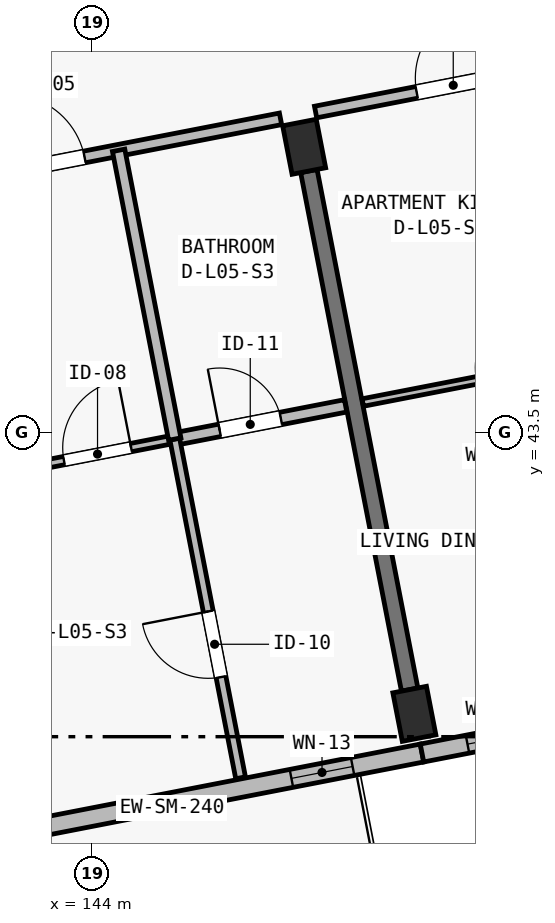
"""IFC4 building model, lengths in metres.
Left out: names, types, materials, properties, quantities, classifications, styles, units other than length and angle.
Written with IfcOpenShell. Run it as: python <this file> out.ifc"""

import sys

from ifc_helpers import new_model, si_unit, direction, frame, frame_2d, origin, origin_2d, place, context, subcontext, project, spatial, rectangle, extrude, element, fill, save


model = new_model("IFC4")
c1 = context("Model", 3, precision=1e-05, world=origin(), true_north=direction((0.0, 1.0)))
c2 = subcontext(c1, "Body", "Model", "MODEL_VIEW")
j1 = project(units=[si_unit("LENGTHUNIT", "METRE"), si_unit("PLANEANGLEUNIT", "RADIAN")], contexts=[c1])
p1 = place(None, origin())
s1 = spatial("IfcSite", under=j1, at=p1, CompositionType="ELEMENT")
p2 = place(p1, origin())
s2 = spatial("IfcBuilding", under=s1, at=p2, CompositionType="ELEMENT")
p3 = place(p2, frame((0.0, 0.0, 18.15)))
s3 = spatial("IfcBuildingStorey", under=s2, at=p3, CompositionType="ELEMENT", Elevation=18.15)
for number, where, z_axis, x_axis in (
    (1, (148.241, 39.801, 0.0), (0.0, 0.0, 1.0), (0.982, 0.191, 0.0)),
    (2, (146.791, 47.261, 0.0), (0.0, 0.0, 1.0), (0.982, 0.191, 0.0)),
):
    element("IfcColumn", number, at=place(p3, frame(where, z_axis=z_axis, x_axis=x_axis)), inside=s3, PredefinedType="COLUMN", context=c2, shape_type="SweptSolid", body=[
        extrude(rectangle(XDim=0.45, YDim=0.65, at=origin_2d()), origin(), (0.0, 0.0, 1.0), 3.25),
    ])
p4 = place(p3, frame((148.179, 40.12, 0.0), z_axis=(0.0, 0.0, 1.0), x_axis=(-0.190817005532, 0.981625626397, 0.0)))
e3 = element("IfcWall", 3, at=p4, inside=s3, PredefinedType="SHEAR", context=c2, shape_type="SweptSolid", body=[
    extrude(rectangle(XDim=6.95, YDim=0.22, at=frame_2d((3.475, 0.0))), origin(), (0.0, 0.0, 1.0), 2.5),
])
p5 = place(p3, frame((148.342, 39.285, 0.0), z_axis=(0.0, 0.0, 1.0), x_axis=(-0.981631269434, -0.190787973596, 0.0)))
e4 = element("IfcWall", 4, at=p5, inside=s3, PredefinedType="SOLIDWALL", context=c2, shape_type="SweptSolid", body=[
    extrude(rectangle(XDim=7.6, YDim=0.24, at=frame_2d((3.8, 0.0))), origin(), (0.0, 0.0, 1.0), 3.0),
])
p6 = place(p5, frame((5.169, 0.0, 0.0)))
e5 = element("IfcOpeningElement", 5, at=p6, cuts=e4, PredefinedType="OPENING", context=c2, shape_type="SweptSolid", body=[
    extrude(rectangle(XDim=1.5, YDim=2.12, at=frame_2d((0.75, 1.06))), frame((0.0, 0.135, 0.0), z_axis=(0.0, -1.0, 0.0), x_axis=(1.0, 0.0, 0.0)), (0.0, 0.0, 1.0), 0.27),
])
p7 = place(p5, frame((0.93, 0.0, 0.5)))
e6 = element("IfcOpeningElement", 6, at=p7, cuts=e4, PredefinedType="OPENING", context=c2, shape_type="SweptSolid", body=[
    extrude(rectangle(XDim=0.82, YDim=2.18, at=frame_2d((0.41, 1.09))), frame((0.0, 0.135, 0.0), z_axis=(0.0, -1.0, 0.0), x_axis=(1.0, 0.0, 0.0)), (0.0, 0.0, 1.0), 0.27),
])
p8 = place(p3, frame((155.802, 40.735, 0.0), z_axis=(0.0, 0.0, 1.0), x_axis=(-0.981626422232, -0.190812911449, 0.0)))
e7 = element("IfcWall", 7, at=p8, inside=s3, PredefinedType="SOLIDWALL", context=c2, shape_type="SweptSolid", body=[
    extrude(rectangle(XDim=7.6, YDim=0.24, at=frame_2d((3.8, 0.0))), origin(), (0.0, 0.0, 1.0), 3.0),
])
p9 = place(p8, frame((1.88, 0.0, 0.42)))
e8 = element("IfcOpeningElement", 8, at=p9, cuts=e7, PredefinedType="OPENING", context=c2, shape_type="SweptSolid", body=[
    extrude(rectangle(XDim=0.64, YDim=2.18, at=frame_2d((0.32, 1.09))), frame((0.0, 0.135, 0.0), z_axis=(0.0, -1.0, 0.0), x_axis=(1.0, 0.0, 0.0)), (0.0, 0.0, 1.0), 0.27),
])
p10 = place(p8, frame((4.848, 0.0, 0.42)))
e9 = element("IfcOpeningElement", 9, at=p10, cuts=e7, PredefinedType="OPENING", context=c2, shape_type="SweptSolid", body=[
    extrude(rectangle(XDim=0.7, YDim=2.36, at=frame_2d((0.35, 1.18))), frame((0.0, 0.135, 0.0), z_axis=(0.0, -1.0, 0.0), x_axis=(1.0, 0.0, 0.0)), (0.0, 0.0, 1.0), 0.27),
])
p11 = place(p8, frame((6.27, 0.0, 0.48)))
e10 = element("IfcOpeningElement", 10, at=p11, cuts=e7, PredefinedType="OPENING", context=c2, shape_type="SweptSolid", body=[
    extrude(rectangle(XDim=0.72, YDim=2.16, at=frame_2d((0.36, 1.08))), frame((0.0, 0.135, 0.0), z_axis=(0.0, -1.0, 0.0), x_axis=(1.0, 0.0, 0.0)), (0.0, 0.0, 1.0), 0.27),
])
p12 = place(p3, frame((142.451, 46.845, 0.0), z_axis=(0.0, 0.0, 1.0), x_axis=(0.981629934904, 0.190794839817, 0.0)))
e11 = element("IfcWall", 11, at=p12, inside=s3, PredefinedType="PARTITIONING", context=c2, shape_type="SweptSolid", body=[
    extrude(rectangle(XDim=4.105, YDim=0.155, at=frame_2d((2.052, 0.0))), origin(), (0.0, 0.0, 1.0), 2.97),
])
p13 = place(p12, frame((0.458, 0.0, 0.0)))
e12 = element("IfcOpeningElement", 12, at=p13, cuts=e11, PredefinedType="OPENING", context=c2, shape_type="SweptSolid", body=[
    extrude(rectangle(XDim=1.02, YDim=2.2, at=frame_2d((0.51, 1.1))), frame((0.0, 0.093, 0.0), z_axis=(0.0, -1.0, 0.0), x_axis=(1.0, 0.0, 0.0)), (0.0, 0.0, 1.0), 0.185),
])
p14 = place(p3, frame((140.102, 42.446, 0.0), z_axis=(0.0, 0.0, 1.0), x_axis=(0.981621892043, 0.19083621528, 0.0)))
e13 = element("IfcWall", 13, at=p14, inside=s3, PredefinedType="PARTITIONING", context=c2, shape_type="SweptSolid", body=[
    extrude(rectangle(XDim=5.08, YDim=0.11, at=frame_2d((2.54, 0.0))), origin(), (0.0, 0.0, 1.0), 2.97),
])
p15 = place(p14, frame((3.595, 0.0, 0.0)))
e14 = element("IfcOpeningElement", 14, at=p15, cuts=e13, PredefinedType="OPENING", context=c2, shape_type="SweptSolid", body=[
    extrude(rectangle(XDim=0.9, YDim=2.1, at=frame_2d((0.45, 1.05))), frame((0.0, 0.07, 0.0), z_axis=(0.0, -1.0, 0.0), x_axis=(1.0, 0.0, 0.0)), (0.0, 0.0, 1.0), 0.14),
])
p16 = place(p3, frame((145.089, 43.416, 0.0), z_axis=(0.0, 0.0, 1.0), x_axis=(0.981640351498, 0.190741239147, 0.0)))
e15 = element("IfcWall", 15, at=p16, inside=s3, PredefinedType="PLUMBINGWALL", context=c2, shape_type="SweptSolid", body=[
    extrude(rectangle(XDim=2.29, YDim=0.165, at=frame_2d((1.145, 0.0))), origin(), (0.0, 0.0, 1.0), 2.97),
])
p17 = place(p16, frame((0.602, 0.0, 0.0)))
e16 = element("IfcOpeningElement", 16, at=p17, cuts=e15, PredefinedType="OPENING", context=c2, shape_type="SweptSolid", body=[
    extrude(rectangle(XDim=0.82, YDim=2.08, at=frame_2d((0.41, 1.04))), frame((0.0, 0.097, 0.0), z_axis=(0.0, -1.0, 0.0), x_axis=(1.0, 0.0, 0.0)), (0.0, 0.0, 1.0), 0.195),
])
p18 = place(p3, frame((145.955, 38.959, 0.0), z_axis=(0.0, 0.0, 1.0), x_axis=(-0.190797690541, 0.981629380817, 0.0)))
e17 = element("IfcWall", 17, at=p18, inside=s3, PredefinedType="PARTITIONING", context=c2, shape_type="SweptSolid", body=[
    extrude(rectangle(XDim=4.54, YDim=0.13, at=frame_2d((2.27, 0.0))), origin(), (0.0, 0.0, 1.0), 2.97),
])
p19 = place(p18, frame((1.35, 0.0, 0.0)))
e18 = element("IfcOpeningElement", 18, at=p19, cuts=e17, PredefinedType="OPENING", context=c2, shape_type="SweptSolid", body=[
    extrude(rectangle(XDim=0.88, YDim=2.1, at=frame_2d((0.44, 1.05))), frame((0.0, 0.08, 0.0), z_axis=(0.0, -1.0, 0.0), x_axis=(1.0, 0.0, 0.0)), (0.0, 0.0, 1.0), 0.16),
])
p20 = place(p3, frame((145.089, 43.416, 0.0), z_axis=(0.0, 0.0, 1.0), x_axis=(-0.190835887914, 0.981621955686, 0.0)))
e19 = element("IfcWall", 19, at=p20, inside=s3, PredefinedType="PLUMBINGWALL", context=c2, shape_type="SweptSolid", body=[
    extrude(rectangle(XDim=3.87, YDim=0.165, at=frame_2d((1.935, 0.0))), origin(), (0.0, 0.0, 1.0), 2.97),
])
p21 = place(p3, frame((146.942, 47.718, 0.0), z_axis=(0.0, 0.0, 1.0), x_axis=(0.981623942594, 0.190825667367, 0.0)))
e20 = element("IfcWall", 20, at=p21, inside=s3, PredefinedType="PARTITIONING", context=c2, shape_type="SweptSolid", body=[
    extrude(rectangle(XDim=7.13, YDim=0.155, at=frame_2d((3.565, 0.0))), origin(), (0.0, 0.0, 1.0), 2.97),
])
p22 = place(p21, frame((1.355, 0.0, 0.0)))
e21 = element("IfcOpeningElement", 21, at=p22, cuts=e20, PredefinedType="OPENING", context=c2, shape_type="SweptSolid", body=[
    extrude(rectangle(XDim=0.98, YDim=2.15, at=frame_2d((0.49, 1.075))), frame((0.0, 0.093, 0.0), z_axis=(0.0, -1.0, 0.0), x_axis=(1.0, 0.0, 0.0)), (0.0, 0.0, 1.0), 0.185),
])
p23 = place(p3, frame((147.562, 43.896, 0.0), z_axis=(0.0, 0.0, 1.0), x_axis=(0.981626422232, 0.190812911449, 0.0)))
e22 = element("IfcWall", 22, at=p23, inside=s3, PredefinedType="PARTITIONING", context=c2, shape_type="SweptSolid", body=[
    extrude(rectangle(XDim=3.685, YDim=0.1, at=frame_2d((1.842, 0.0))), origin(), (0.0, 0.0, 1.0), 2.97),
])
p24 = place(p23, frame((1.525, 0.0, 0.0)))
e23 = element("IfcOpeningElement", 23, at=p24, cuts=e22, PredefinedType="OPENING", context=c2, shape_type="SweptSolid", body=[
    extrude(rectangle(XDim=0.88, YDim=2.1, at=frame_2d((0.44, 1.05))), frame((0.0, 0.065, 0.0), z_axis=(0.0, -1.0, 0.0), x_axis=(1.0, 0.0, 0.0)), (0.0, 0.0, 1.0), 0.13),
])
p25 = place(p7, origin())
e24 = element("IfcWindow", 24, at=p25, inside=s3, PartitioningType="SINGLE_PANEL", PredefinedType="WINDOW", context=c2, shape_type="SweptSolid", body=[
    extrude(rectangle(XDim=0.82, YDim=2.18, at=frame_2d((0.41, 1.09))), frame((0.0, 0.03, 0.0), z_axis=(0.0, -1.0, 0.0), x_axis=(1.0, 0.0, 0.0)), (0.0, 0.0, 1.0), 0.06),
])
fill(e6, e24)
p26 = place(p11, origin())
e25 = element("IfcWindow", 25, at=p26, inside=s3, PartitioningType="SINGLE_PANEL", PredefinedType="WINDOW", context=c2, shape_type="SweptSolid", body=[
    extrude(rectangle(XDim=0.72, YDim=2.16, at=frame_2d((0.36, 1.08))), frame((0.0, 0.03, 0.0), z_axis=(0.0, -1.0, 0.0), x_axis=(1.0, 0.0, 0.0)), (0.0, 0.0, 1.0), 0.06),
])
fill(e10, e25)
p27 = place(p13, origin())
e26 = element("IfcDoor", 26, at=p27, inside=s3, OperationType="SINGLE_SWING_LEFT", PredefinedType="DOOR", context=c2, shape_type="SweptSolid", body=[
    extrude(rectangle(XDim=1.02, YDim=2.2, at=frame_2d((0.51, 1.1))), frame((0.0, 0.025, 0.0), z_axis=(0.0, -1.0, 0.0), x_axis=(1.0, 0.0, 0.0)), (0.0, 0.0, 1.0), 0.05),
])
fill(e12, e26)
p28 = place(p15, origin())
e27 = element("IfcDoor", 27, at=p28, inside=s3, OperationType="SINGLE_SWING_RIGHT", PredefinedType="DOOR", context=c2, shape_type="SweptSolid", body=[
    extrude(rectangle(XDim=0.9, YDim=2.1, at=frame_2d((0.45, 1.05))), frame((0.0, 0.025, 0.0), z_axis=(0.0, -1.0, 0.0), x_axis=(1.0, 0.0, 0.0)), (0.0, 0.0, 1.0), 0.05),
])
fill(e14, e27)
p29 = place(p17, origin())
e28 = element("IfcDoor", 28, at=p29, inside=s3, OperationType="SINGLE_SWING_LEFT", PredefinedType="DOOR", context=c2, shape_type="SweptSolid", body=[
    extrude(rectangle(XDim=0.82, YDim=2.08, at=frame_2d((0.41, 1.04))), frame((0.0, 0.025, 0.0), z_axis=(0.0, -1.0, 0.0), x_axis=(1.0, 0.0, 0.0)), (0.0, 0.0, 1.0), 0.05),
])
fill(e16, e28)
p30 = place(p19, origin())
e29 = element("IfcDoor", 29, at=p30, inside=s3, OperationType="SINGLE_SWING_RIGHT", PredefinedType="DOOR", context=c2, shape_type="SweptSolid", body=[
    extrude(rectangle(XDim=0.88, YDim=2.1, at=frame_2d((0.44, 1.05))), frame((0.0, 0.025, 0.0), z_axis=(0.0, -1.0, 0.0), x_axis=(1.0, 0.0, 0.0)), (0.0, 0.0, 1.0), 0.05),
])
fill(e18, e29)
p31 = place(p22, origin())
e30 = element("IfcDoor", 30, at=p31, inside=s3, OperationType="SINGLE_SWING_RIGHT", PredefinedType="DOOR", context=c2, shape_type="SweptSolid", body=[
    extrude(rectangle(XDim=0.98, YDim=2.15, at=frame_2d((0.49, 1.075))), frame((0.0, 0.025, 0.0), z_axis=(0.0, -1.0, 0.0), x_axis=(1.0, 0.0, 0.0)), (0.0, 0.0, 1.0), 0.05),
])
fill(e21, e30)
save(model, sys.argv[1])
